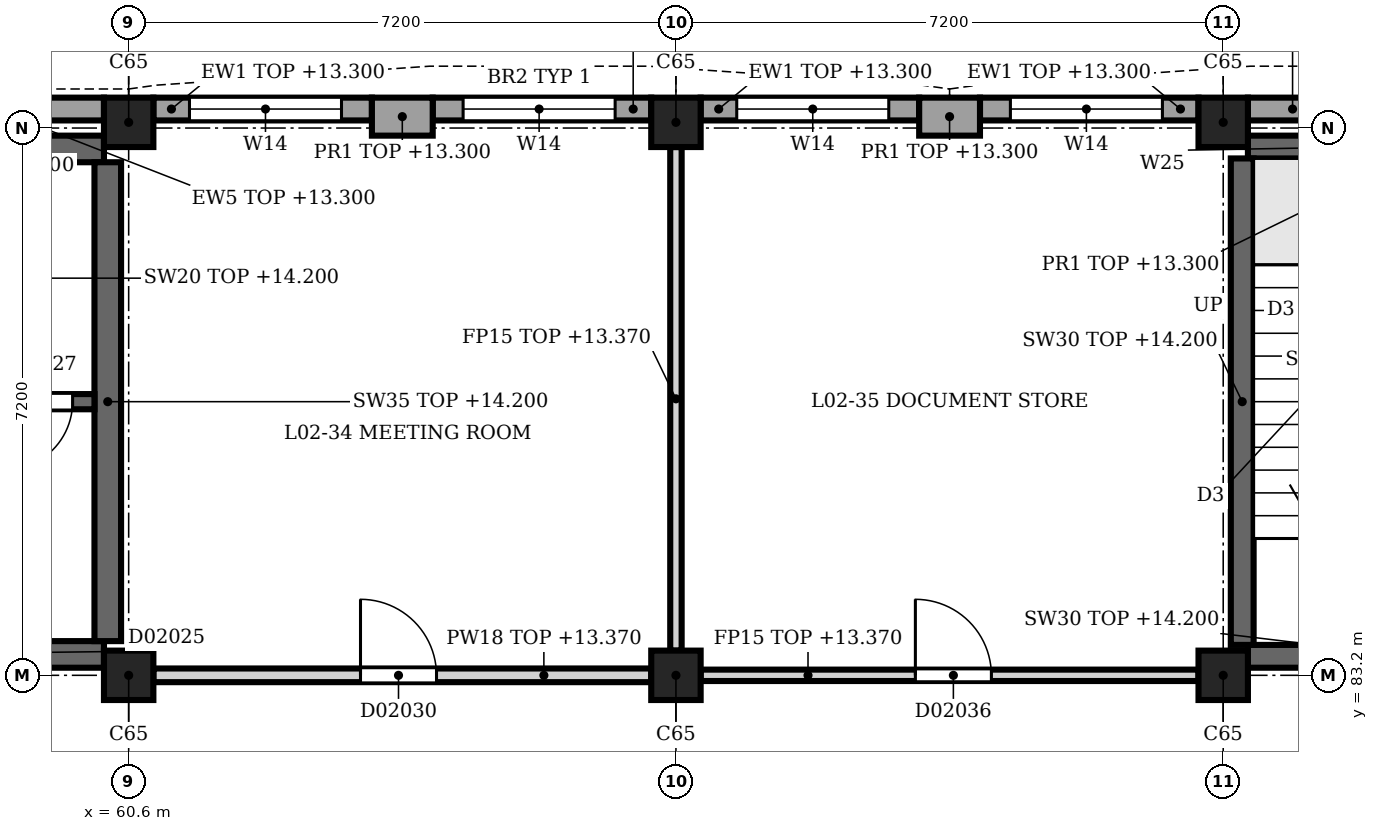
"""IFC4 building model, lengths in metres.
Left out: names, types, materials, properties, quantities, classifications, styles, units other than length and angle.
Written with IfcOpenShell. Run it as: python <this file> out.ifc"""

import sys

from ifc_helpers import new_model, si_unit, direction, frame, frame_2d, origin, origin_2d, place, context, subcontext, project, spatial, rectangle, extrude, element, fill, save


model = new_model("IFC4")
c1 = context("Model", 3, precision=1e-05, world=origin(), true_north=direction((0.0, 1.0)))
c2 = subcontext(c1, "Body", "Model", "MODEL_VIEW")
j1 = project(units=[si_unit("LENGTHUNIT", "METRE"), si_unit("PLANEANGLEUNIT", "RADIAN")], contexts=[c1])
p1 = place(None, origin())
s1 = spatial("IfcSite", under=j1, at=p1, CompositionType="ELEMENT")
p2 = place(p1, origin())
s2 = spatial("IfcBuilding", under=s1, at=p2, CompositionType="ELEMENT")
p3 = place(p2, frame((0.0, 0.0, 9.9)))
s3 = spatial("IfcBuildingStorey", under=s2, at=p3, CompositionType="ELEMENT", Elevation=9.9)
for number, where, z_axis, x_axis in (
    (1, (60.6, 83.2, 0.0), (0.0, 0.0, 1.0), (1.0, 0.0, 0.0)),
    (2, (60.6, 90.475, 0.0), (0.0, 0.0, 1.0), (1.0, 0.0, 0.0)),
    (3, (67.8, 83.2, 0.0), (0.0, 0.0, 1.0), (1.0, 0.0, 0.0)),
    (4, (67.8, 90.475, 0.0), (0.0, 0.0, 1.0), (1.0, 0.0, 0.0)),
    (5, (75.0, 83.2, 0.0), (0.0, 0.0, 1.0), (1.0, 0.0, 0.0)),
    (6, (75.0, 90.475, 0.0), (0.0, 0.0, 1.0), (1.0, 0.0, 0.0)),
):
    element("IfcColumn", number, at=place(p3, frame(where, z_axis=z_axis, x_axis=x_axis)), inside=s3, PredefinedType="COLUMN", context=c2, shape_type="SweptSolid", body=[
        extrude(rectangle(XDim=0.65, YDim=0.65, at=origin_2d()), origin(), (0.0, 0.0, 1.0), 4.5),
    ])
for number, where, z_axis, x_axis in (
    (7, (63.8, 90.55, 0.0), (0.0, 0.0, 1.0), (1.0, 0.0, 0.0)),
    (8, (71.0, 90.55, 0.0), (0.0, 0.0, 1.0), (1.0, 0.0, 0.0)),
):
    element("IfcWall", number, at=place(p3, frame(where, z_axis=z_axis, x_axis=x_axis)), inside=s3, PredefinedType="SOLIDWALL", context=c2, shape_type="SweptSolid", body=[
        extrude(rectangle(XDim=0.8, YDim=0.5, at=frame_2d((0.4, 0.0))), origin(), (0.0, 0.0, 1.0), 3.4),
    ])
p4 = place(p3, frame((57.4, 90.65, 0.0), z_axis=(0.0, 0.0, 1.0), x_axis=(1.0, 0.0, 0.0)))
e9 = element("IfcWall", 9, at=p4, inside=s3, PredefinedType="SOLIDWALL", context=c2, shape_type="SweptSolid", body=[
    extrude(rectangle(XDim=2.875, YDim=0.3, at=frame_2d((1.438, 0.0))), origin(), (0.0, 0.0, 1.0), 3.4),
])
p5 = place(p3, frame((60.925, 90.65, 0.0), z_axis=(0.0, 0.0, 1.0), x_axis=(1.0, 0.0, 0.0)))
e10 = element("IfcWall", 10, at=p5, inside=s3, PredefinedType="SOLIDWALL", context=c2, shape_type="SweptSolid", body=[
    extrude(rectangle(XDim=2.875, YDim=0.3, at=frame_2d((1.438, 0.0))), origin(), (0.0, 0.0, 1.0), 3.4),
])
p6 = place(p5, frame((0.475, 0.0, 0.9)))
e11 = element("IfcOpeningElement", 11, at=p6, cuts=e10, PredefinedType="OPENING", context=c2, shape_type="SweptSolid", body=[
    extrude(rectangle(XDim=2.0, YDim=2.4, at=frame_2d((1.0, 1.2))), frame((0.0, 0.16, 0.0), z_axis=(0.0, -1.0, 0.0), x_axis=(1.0, 0.0, 0.0)), (0.0, 0.0, 1.0), 0.32),
])
p7 = place(p3, frame((64.6, 90.65, 0.0), z_axis=(0.0, 0.0, 1.0), x_axis=(1.0, 0.0, 0.0)))
e12 = element("IfcWall", 12, at=p7, inside=s3, PredefinedType="SOLIDWALL", context=c2, shape_type="SweptSolid", body=[
    extrude(rectangle(XDim=2.875, YDim=0.3, at=frame_2d((1.438, 0.0))), origin(), (0.0, 0.0, 1.0), 3.4),
])
p8 = place(p7, frame((0.4, 0.0, 0.9)))
e13 = element("IfcOpeningElement", 13, at=p8, cuts=e12, PredefinedType="OPENING", context=c2, shape_type="SweptSolid", body=[
    extrude(rectangle(XDim=2.0, YDim=2.4, at=frame_2d((1.0, 1.2))), frame((0.0, 0.16, 0.0), z_axis=(0.0, -1.0, 0.0), x_axis=(1.0, 0.0, 0.0)), (0.0, 0.0, 1.0), 0.32),
])
p9 = place(p3, frame((68.125, 90.65, 0.0), z_axis=(0.0, 0.0, 1.0), x_axis=(1.0, 0.0, 0.0)))
e14 = element("IfcWall", 14, at=p9, inside=s3, PredefinedType="SOLIDWALL", context=c2, shape_type="SweptSolid", body=[
    extrude(rectangle(XDim=2.875, YDim=0.3, at=frame_2d((1.438, 0.0))), origin(), (0.0, 0.0, 1.0), 3.4),
])
p10 = place(p9, frame((0.475, 0.0, 0.9)))
e15 = element("IfcOpeningElement", 15, at=p10, cuts=e14, PredefinedType="OPENING", context=c2, shape_type="SweptSolid", body=[
    extrude(rectangle(XDim=2.0, YDim=2.4, at=frame_2d((1.0, 1.2))), frame((0.0, 0.16, 0.0), z_axis=(0.0, -1.0, 0.0), x_axis=(1.0, 0.0, 0.0)), (0.0, 0.0, 1.0), 0.32),
])
p11 = place(p3, frame((71.8, 90.65, 0.0), z_axis=(0.0, 0.0, 1.0), x_axis=(1.0, 0.0, 0.0)))
e16 = element("IfcWall", 16, at=p11, inside=s3, PredefinedType="SOLIDWALL", context=c2, shape_type="SweptSolid", body=[
    extrude(rectangle(XDim=2.875, YDim=0.3, at=frame_2d((1.438, 0.0))), origin(), (0.0, 0.0, 1.0), 3.4),
])
p12 = place(p11, frame((0.4, 0.0, 0.9)))
e17 = element("IfcOpeningElement", 17, at=p12, cuts=e16, PredefinedType="OPENING", context=c2, shape_type="SweptSolid", body=[
    extrude(rectangle(XDim=2.0, YDim=2.4, at=frame_2d((1.0, 1.2))), frame((0.0, 0.16, 0.0), z_axis=(0.0, -1.0, 0.0), x_axis=(1.0, 0.0, 0.0)), (0.0, 0.0, 1.0), 0.32),
])
p13 = place(p3, frame((75.325, 90.65, 0.0), z_axis=(0.0, 0.0, 1.0), x_axis=(1.0, 0.0, 0.0)))
e18 = element("IfcWall", 18, at=p13, inside=s3, PredefinedType="SOLIDWALL", context=c2, shape_type="SweptSolid", body=[
    extrude(rectangle(XDim=2.875, YDim=0.3, at=frame_2d((1.438, 0.0))), origin(), (0.0, 0.0, 1.0), 3.4),
])
p14 = place(p13, frame((1.175, 0.0, 1.2)))
e19 = element("IfcOpeningElement", 19, at=p14, cuts=e18, PredefinedType="OPENING", context=c2, shape_type="SweptSolid", body=[
    extrude(rectangle(XDim=0.6, YDim=1.8, at=frame_2d((0.3, 0.9))), frame((0.0, 0.16, 0.0), z_axis=(0.0, -1.0, 0.0), x_axis=(1.0, 0.0, 0.0)), (0.0, 0.0, 1.0), 0.32),
])
p15 = place(p3, frame((53.725, 83.475, 0.0), z_axis=(0.0, 0.0, 1.0), x_axis=(1.0, 0.0, 0.0)))
e20 = element("IfcWall", 20, at=p15, inside=s3, PredefinedType="SHEAR", context=c2, shape_type="SweptSolid", body=[
    extrude(rectangle(XDim=6.55, YDim=0.35, at=frame_2d((3.275, 0.0))), origin(), (0.0, 0.0, 1.0), 4.3),
])
p16 = place(p15, frame((2.675, 0.0, 0.0)))
e21 = element("IfcOpeningElement", 21, at=p16, cuts=e20, PredefinedType="OPENING", context=c2, shape_type="SweptSolid", body=[
    extrude(rectangle(XDim=1.8, YDim=2.1, at=frame_2d((0.9, 1.05))), frame((0.0, 0.185, 0.0), z_axis=(0.0, -1.0, 0.0), x_axis=(1.0, 0.0, 0.0)), (0.0, 0.0, 1.0), 0.37),
])
p17 = place(p3, frame((53.725, 90.125, 0.0), z_axis=(0.0, 0.0, 1.0), x_axis=(1.0, 0.0, 0.0)))
e22 = element("IfcWall", 22, at=p17, inside=s3, PredefinedType="SHEAR", context=c2, shape_type="SweptSolid", body=[
    extrude(rectangle(XDim=6.55, YDim=0.35, at=frame_2d((3.275, 0.0))), origin(), (0.0, 0.0, 1.0), 4.3),
])
p18 = place(p3, frame((60.325, 83.65, 0.0), z_axis=(0.0, 0.0, 1.0), x_axis=(0.0, 1.0, 0.0)))
e23 = element("IfcWall", 23, at=p18, inside=s3, PredefinedType="SHEAR", context=c2, shape_type="SweptSolid", body=[
    extrude(rectangle(XDim=6.3, YDim=0.35, at=frame_2d((3.15, 0.0))), origin(), (0.0, 0.0, 1.0), 4.3),
])
p19 = place(p3, frame((60.15, 86.8, 0.0), z_axis=(0.0, 0.0, 1.0), x_axis=(-1.0, 0.0, 0.0)))
e24 = element("IfcWall", 24, at=p19, inside=s3, PredefinedType="SHEAR", context=c2, shape_type="SweptSolid", body=[
    extrude(rectangle(XDim=10.35, YDim=0.2, at=frame_2d((5.175, 0.0))), origin(), (0.0, 0.0, 1.0), 4.3),
])
p20 = place(p19, frame((8.8, 0.0, 0.0)))
e25 = element("IfcOpeningElement", 25, at=p20, cuts=e24, PredefinedType="OPENING", context=c2, shape_type="SweptSolid", body=[
    extrude(rectangle(XDim=1.1, YDim=2.1, at=frame_2d((0.55, 1.05))), frame((0.0, 0.11, 0.0), z_axis=(0.0, -1.0, 0.0), x_axis=(1.0, 0.0, 0.0)), (0.0, 0.0, 1.0), 0.22),
])
p21 = place(p19, frame((6.6, 0.0, 0.0)))
e26 = element("IfcOpeningElement", 26, at=p21, cuts=e24, PredefinedType="OPENING", context=c2, shape_type="SweptSolid", body=[
    extrude(rectangle(XDim=1.1, YDim=2.1, at=frame_2d((0.55, 1.05))), frame((0.0, 0.11, 0.0), z_axis=(0.0, -1.0, 0.0), x_axis=(1.0, 0.0, 0.0)), (0.0, 0.0, 1.0), 0.22),
])
p22 = place(p19, frame((3.75, 0.0, 0.0)))
e27 = element("IfcOpeningElement", 27, at=p22, cuts=e24, PredefinedType="OPENING", context=c2, shape_type="SweptSolid", body=[
    extrude(rectangle(XDim=1.4, YDim=2.1, at=frame_2d((0.7, 1.05))), frame((0.0, 0.11, 0.0), z_axis=(0.0, -1.0, 0.0), x_axis=(1.0, 0.0, 0.0)), (0.0, 0.0, 1.0), 0.22),
])
p23 = place(p19, frame((1.962, 0.0, 0.0)))
e28 = element("IfcOpeningElement", 28, at=p23, cuts=e24, PredefinedType="OPENING", context=c2, shape_type="SweptSolid", body=[
    extrude(rectangle(XDim=0.9, YDim=2.1, at=frame_2d((0.45, 1.05))), frame((0.0, 0.11, 0.0), z_axis=(0.0, -1.0, 0.0), x_axis=(1.0, 0.0, 0.0)), (0.0, 0.0, 1.0), 0.22),
])
p24 = place(p19, frame((0.288, 0.0, 0.0)))
e29 = element("IfcOpeningElement", 29, at=p24, cuts=e24, PredefinedType="OPENING", context=c2, shape_type="SweptSolid", body=[
    extrude(rectangle(XDim=0.9, YDim=2.1, at=frame_2d((0.45, 1.05))), frame((0.0, 0.11, 0.0), z_axis=(0.0, -1.0, 0.0), x_axis=(1.0, 0.0, 0.0)), (0.0, 0.0, 1.0), 0.22),
])
p25 = place(p3, frame((75.325, 83.45, 0.0), z_axis=(0.0, 0.0, 1.0), x_axis=(1.0, 0.0, 0.0)))
e30 = element("IfcWall", 30, at=p25, inside=s3, PredefinedType="SHEAR", context=c2, shape_type="SweptSolid", body=[
    extrude(rectangle(XDim=6.55, YDim=0.3, at=frame_2d((3.275, 0.0))), origin(), (0.0, 0.0, 1.0), 4.3),
])
p26 = place(p25, frame((4.275, 0.0, 0.0)))
e31 = element("IfcOpeningElement", 31, at=p26, cuts=e30, PredefinedType="OPENING", context=c2, shape_type="SweptSolid", body=[
    extrude(rectangle(XDim=1.2, YDim=2.1, at=frame_2d((0.6, 1.05))), frame((0.0, 0.16, 0.0), z_axis=(0.0, -1.0, 0.0), x_axis=(1.0, 0.0, 0.0)), (0.0, 0.0, 1.0), 0.32),
])
p27 = place(p3, frame((75.325, 90.15, 0.0), z_axis=(0.0, 0.0, 1.0), x_axis=(1.0, 0.0, 0.0)))
e32 = element("IfcWall", 32, at=p27, inside=s3, PredefinedType="SHEAR", context=c2, shape_type="SweptSolid", body=[
    extrude(rectangle(XDim=6.55, YDim=0.3, at=frame_2d((3.275, 0.0))), origin(), (0.0, 0.0, 1.0), 4.3),
])
p28 = place(p27, frame((1.175, 0.0, 1.2)))
e33 = element("IfcOpeningElement", 33, at=p28, cuts=e32, PredefinedType="OPENING", context=c2, shape_type="SweptSolid", body=[
    extrude(rectangle(XDim=0.6, YDim=1.8, at=frame_2d((0.3, 0.9))), frame((0.0, 0.16, 0.0), z_axis=(0.0, -1.0, 0.0), x_axis=(1.0, 0.0, 0.0)), (0.0, 0.0, 1.0), 0.32),
])
p29 = place(p3, frame((75.25, 83.6, 0.0), z_axis=(0.0, 0.0, 1.0), x_axis=(0.0, 1.0, 0.0)))
e34 = element("IfcWall", 34, at=p29, inside=s3, PredefinedType="SHEAR", context=c2, shape_type="SweptSolid", body=[
    extrude(rectangle(XDim=6.4, YDim=0.3, at=frame_2d((3.2, 0.0))), origin(), (0.0, 0.0, 1.0), 4.3),
])
p30 = place(p3, frame((60.925, 83.2, 0.0), z_axis=(0.0, 0.0, 1.0), x_axis=(1.0, 0.0, 0.0)))
e35 = element("IfcWall", 35, at=p30, inside=s3, PredefinedType="PARTITIONING", context=c2, shape_type="SweptSolid", body=[
    extrude(rectangle(XDim=6.55, YDim=0.18, at=frame_2d((3.275, 0.0))), origin(), (0.0, 0.0, 1.0), 3.47),
])
p31 = place(p30, frame((2.725, 0.0, 0.0)))
e36 = element("IfcOpeningElement", 36, at=p31, cuts=e35, PredefinedType="OPENING", context=c2, shape_type="SweptSolid", body=[
    extrude(rectangle(XDim=1.0, YDim=2.1, at=frame_2d((0.5, 1.05))), frame((0.0, 0.1, 0.0), z_axis=(0.0, -1.0, 0.0), x_axis=(1.0, 0.0, 0.0)), (0.0, 0.0, 1.0), 0.2),
])
p32 = place(p3, frame((68.125, 83.2, 0.0), z_axis=(0.0, 0.0, 1.0), x_axis=(1.0, 0.0, 0.0)))
e37 = element("IfcWall", 37, at=p32, inside=s3, PredefinedType="PARTITIONING", context=c2, shape_type="SweptSolid", body=[
    extrude(rectangle(XDim=6.55, YDim=0.15, at=frame_2d((3.275, 0.0))), origin(), (0.0, 0.0, 1.0), 3.47),
])
p33 = place(p32, frame((2.825, 0.0, 0.0)))
e38 = element("IfcOpeningElement", 38, at=p33, cuts=e37, PredefinedType="OPENING", context=c2, shape_type="SweptSolid", body=[
    extrude(rectangle(XDim=1.0, YDim=2.1, at=frame_2d((0.5, 1.05))), frame((0.0, 0.085, 0.0), z_axis=(0.0, -1.0, 0.0), x_axis=(1.0, 0.0, 0.0)), (0.0, 0.0, 1.0), 0.17),
])
p34 = place(p3, frame((67.8, 83.525, 0.0), z_axis=(0.0, 0.0, 1.0), x_axis=(0.0, 1.0, 0.0)))
e39 = element("IfcWall", 39, at=p34, inside=s3, PredefinedType="PARTITIONING", context=c2, shape_type="SweptSolid", body=[
    extrude(rectangle(XDim=6.625, YDim=0.15, at=frame_2d((3.312, 0.0))), origin(), (0.0, 0.0, 1.0), 3.47),
])
p35 = place(p6, origin())
e40 = element("IfcWindow", 40, at=p35, inside=s3, PartitioningType="SINGLE_PANEL", PredefinedType="WINDOW", context=c2, shape_type="SweptSolid", body=[
    extrude(rectangle(XDim=2.0, YDim=2.4, at=frame_2d((1.0, 1.2))), frame((0.0, 0.03, 0.0), z_axis=(0.0, -1.0, 0.0), x_axis=(1.0, 0.0, 0.0)), (0.0, 0.0, 1.0), 0.06),
])
fill(e11, e40)
p36 = place(p8, origin())
e41 = element("IfcWindow", 41, at=p36, inside=s3, PartitioningType="SINGLE_PANEL", PredefinedType="WINDOW", context=c2, shape_type="SweptSolid", body=[
    extrude(rectangle(XDim=2.0, YDim=2.4, at=frame_2d((1.0, 1.2))), frame((0.0, 0.03, 0.0), z_axis=(0.0, -1.0, 0.0), x_axis=(1.0, 0.0, 0.0)), (0.0, 0.0, 1.0), 0.06),
])
fill(e13, e41)
p37 = place(p10, origin())
e42 = element("IfcWindow", 42, at=p37, inside=s3, PartitioningType="SINGLE_PANEL", PredefinedType="WINDOW", context=c2, shape_type="SweptSolid", body=[
    extrude(rectangle(XDim=2.0, YDim=2.4, at=frame_2d((1.0, 1.2))), frame((0.0, 0.03, 0.0), z_axis=(0.0, -1.0, 0.0), x_axis=(1.0, 0.0, 0.0)), (0.0, 0.0, 1.0), 0.06),
])
fill(e15, e42)
p38 = place(p12, origin())
e43 = element("IfcWindow", 43, at=p38, inside=s3, PartitioningType="SINGLE_PANEL", PredefinedType="WINDOW", context=c2, shape_type="SweptSolid", body=[
    extrude(rectangle(XDim=2.0, YDim=2.4, at=frame_2d((1.0, 1.2))), frame((0.0, 0.03, 0.0), z_axis=(0.0, -1.0, 0.0), x_axis=(1.0, 0.0, 0.0)), (0.0, 0.0, 1.0), 0.06),
])
fill(e17, e43)
p39 = place(p24, origin())
e44 = element("IfcDoor", 44, at=p39, inside=s3, OperationType="SINGLE_SWING_LEFT", PredefinedType="DOOR", context=c2, shape_type="SweptSolid", body=[
    extrude(rectangle(XDim=0.9, YDim=2.1, at=frame_2d((0.45, 1.05))), frame((0.0, 0.025, 0.0), z_axis=(0.0, -1.0, 0.0), x_axis=(1.0, 0.0, 0.0)), (0.0, 0.0, 1.0), 0.05),
])
fill(e29, e44)
p40 = place(p31, origin())
e45 = element("IfcDoor", 45, at=p40, inside=s3, OperationType="SINGLE_SWING_LEFT", PredefinedType="DOOR", context=c2, shape_type="SweptSolid", body=[
    extrude(rectangle(XDim=1.0, YDim=2.1, at=frame_2d((0.5, 1.05))), frame((0.0, 0.025, 0.0), z_axis=(0.0, -1.0, 0.0), x_axis=(1.0, 0.0, 0.0)), (0.0, 0.0, 1.0), 0.05),
])
fill(e36, e45)
p41 = place(p33, origin())
e46 = element("IfcDoor", 46, at=p41, inside=s3, OperationType="SINGLE_SWING_RIGHT", PredefinedType="DOOR", context=c2, shape_type="SweptSolid", body=[
    extrude(rectangle(XDim=1.0, YDim=2.1, at=frame_2d((0.5, 1.05))), frame((0.0, 0.025, 0.0), z_axis=(0.0, -1.0, 0.0), x_axis=(1.0, 0.0, 0.0)), (0.0, 0.0, 1.0), 0.05),
])
fill(e38, e46)
save(model, sys.argv[1])
